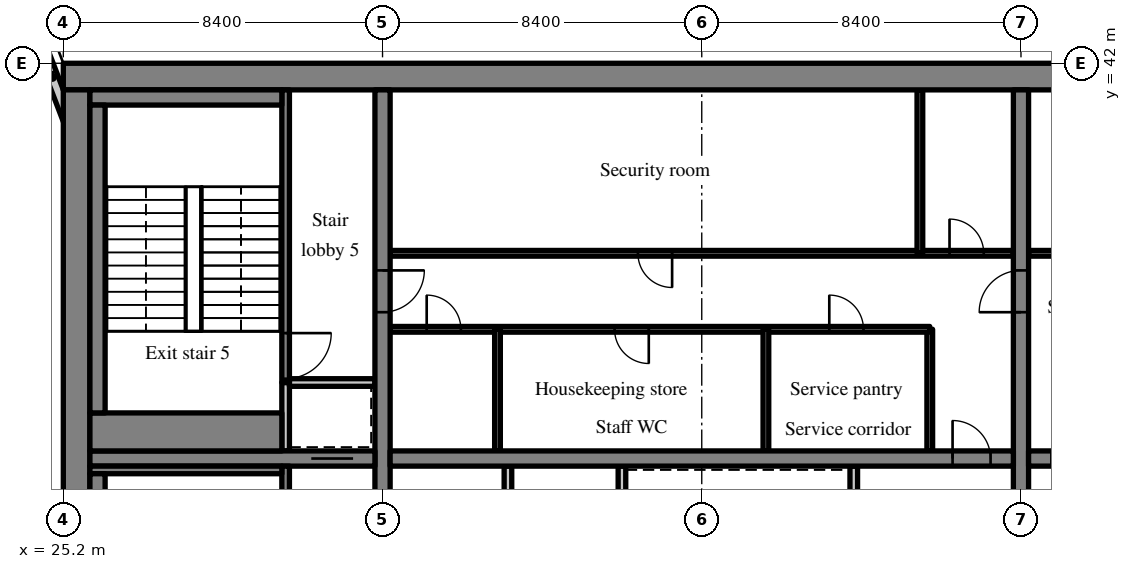
"""IFC4 building model, lengths in metres.
Left out: names, types, materials, properties, quantities, classifications, styles, units other than length and angle.
Written with IfcOpenShell. Run it as: python <this file> out.ifc"""

import sys

from ifc_helpers import new_model, si_unit, direction, frame, frame_2d, origin, place, context, subcontext, project, spatial, rectangle, extrude, source, transform, mapped, element, fill, save


model = new_model("IFC4")
c1 = context("Model", 3, precision=1e-05, world=origin(), true_north=direction((0.0, 1.0)))
c2 = subcontext(c1, "Body", "Model", "MODEL_VIEW")
j1 = project(units=[si_unit("LENGTHUNIT", "METRE"), si_unit("PLANEANGLEUNIT", "RADIAN")], contexts=[c1])
p1 = place(None, origin())
s1 = spatial("IfcSite", under=j1, at=p1, CompositionType="ELEMENT")
p2 = place(p1, origin())
s2 = spatial("IfcBuilding", under=s1, at=p2, CompositionType="ELEMENT")
p3 = place(p2, frame((0.0, 0.0, 185.8)))
s3 = spatial("IfcBuildingStorey", under=s2, at=p3, CompositionType="ELEMENT", Elevation=185.8)
m1 = source(origin(), c2, "Body", "SweptSolid", [
    extrude(rectangle(XDim=50.4, YDim=0.7, at=frame_2d((25.2, 0.0))), origin(), (0.0, 0.0, 1.0), 3.52),
])
p4 = place(p3, frame((25.2, 41.65, 0.0), z_axis=(0.0, 0.0, 1.0), x_axis=(1.0, 0.0, 0.0)))
e1 = element("IfcWall", 1, at=p4, inside=s3, PredefinedType="SHEAR", context=c2, shape_type="MappedRepresentation", body=[
    mapped(m1, transform((0.0, 0.0, 0.0), scale=1.0)),
])
m2 = source(origin(), c2, "Body", "SweptSolid", [
    extrude(rectangle(XDim=18.6, YDim=0.7, at=frame_2d((9.3, 0.0))), origin(), (0.0, 0.0, 1.0), 3.52),
])
p5 = place(p3, frame((25.55, 22.7, 0.0), z_axis=(0.0, 0.0, 1.0), x_axis=(0.0, 1.0, 0.0)))
e2 = element("IfcWall", 2, at=p5, inside=s3, PredefinedType="SHEAR", context=c2, shape_type="MappedRepresentation", body=[
    mapped(m2, transform((0.0, 0.0, 0.0), scale=1.0)),
])
m3 = source(origin(), c2, "Body", "SweptSolid", [
    extrude(rectangle(XDim=18.6, YDim=0.4, at=frame_2d((9.3, 0.0))), origin(), (0.0, 0.0, 1.0), 3.52),
])
p6 = place(p3, frame((33.6, 22.7, 0.0), z_axis=(0.0, 0.0, 1.0), x_axis=(0.0, 1.0, 0.0)))
e3 = element("IfcWall", 3, at=p6, inside=s3, PredefinedType="SHEAR", context=c2, shape_type="MappedRepresentation", body=[
    mapped(m3, transform((0.0, 0.0, 0.0), scale=1.0)),
])
m4 = source(origin(), c2, "Body", "SweptSolid", [
    extrude(rectangle(XDim=1.1, YDim=2.1, at=frame_2d((0.55, 1.05))), frame((0.0, 0.21, 0.0), z_axis=(0.0, -1.0, 0.0), x_axis=(1.0, 0.0, 0.0)), (0.0, 0.0, 1.0), 0.42),
])
p7 = place(p6, frame((12.75, 0.0, 0.0)))
e4 = element("IfcOpeningElement", 4, at=p7, cuts=e3, PredefinedType="OPENING", context=c2, shape_type="MappedRepresentation", body=[
    mapped(m4, transform((0.0, 0.0, 0.0), scale=1.0)),
])
p8 = place(p3, frame((50.4, 22.7, 0.0), z_axis=(0.0, 0.0, 1.0), x_axis=(0.0, 1.0, 0.0)))
e5 = element("IfcWall", 5, at=p8, inside=s3, PredefinedType="SHEAR", context=c2, shape_type="MappedRepresentation", body=[
    mapped(m3, transform((0.0, 0.0, 0.0), scale=1.0)),
])
p9 = place(p8, frame((12.75, 0.0, 0.0)))
e6 = element("IfcOpeningElement", 6, at=p9, cuts=e5, PredefinedType="OPENING", context=c2, shape_type="MappedRepresentation", body=[
    mapped(m4, transform((0.0, 0.0, 0.0), scale=1.0)),
])
m5 = source(origin(), c2, "Body", "SweptSolid", [
    extrude(rectangle(XDim=7.5, YDim=0.4, at=frame_2d((3.75, 0.0))), origin(), (0.0, 0.0, 1.0), 3.52),
])
p10 = place(p3, frame((25.9, 31.6, 0.0), z_axis=(0.0, 0.0, 1.0), x_axis=(1.0, 0.0, 0.0)))
e7 = element("IfcWall", 7, at=p10, inside=s3, PredefinedType="SHEAR", context=c2, shape_type="MappedRepresentation", body=[
    mapped(m5, transform((0.0, 0.0, 0.0), scale=1.0)),
])
p11 = place(p10, frame((5.825, 0.0, 0.0)))
e8 = element("IfcOpeningElement", 8, at=p11, cuts=e7, PredefinedType="OPENING", context=c2, shape_type="MappedRepresentation", body=[
    mapped(m4, transform((0.0, 0.0, 0.0), scale=1.0)),
])
m6 = source(origin(), c2, "Body", "SweptSolid", [
    extrude(rectangle(XDim=16.4, YDim=0.4, at=frame_2d((8.2, 0.0))), origin(), (0.0, 0.0, 1.0), 3.52),
])
p12 = place(p3, frame((33.8, 31.6, 0.0), z_axis=(0.0, 0.0, 1.0), x_axis=(1.0, 0.0, 0.0)))
e9 = element("IfcWall", 9, at=p12, inside=s3, PredefinedType="SHEAR", context=c2, shape_type="MappedRepresentation", body=[
    mapped(m6, transform((0.0, 0.0, 0.0), scale=1.0)),
])
m7 = source(origin(), c2, "Body", "SweptSolid", [
    extrude(rectangle(XDim=1.0, YDim=2.1, at=frame_2d((0.5, 1.05))), frame((0.0, 0.21, 0.0), z_axis=(0.0, -1.0, 0.0), x_axis=(1.0, 0.0, 0.0)), (0.0, 0.0, 1.0), 0.42),
])
p13 = place(p12, frame((14.8, 0.0, 0.0)))
e10 = element("IfcOpeningElement", 10, at=p13, cuts=e9, PredefinedType="OPENING", context=c2, shape_type="MappedRepresentation", body=[
    mapped(m7, transform((0.0, 0.0, 0.0), scale=1.0)),
])
p14 = place(p3, frame((50.6, 31.6, 0.0), z_axis=(0.0, 0.0, 1.0), x_axis=(1.0, 0.0, 0.0)))
e11 = element("IfcWall", 11, at=p14, inside=s3, PredefinedType="SHEAR", context=c2, shape_type="MappedRepresentation", body=[
    mapped(m6, transform((0.0, 0.0, 0.0), scale=1.0)),
])
p15 = place(p14, frame((0.6, 0.0, 0.0)))
e12 = element("IfcOpeningElement", 12, at=p15, cuts=e11, PredefinedType="OPENING", context=c2, shape_type="MappedRepresentation", body=[
    mapped(m7, transform((0.0, 0.0, 0.0), scale=1.0)),
])
m8 = source(origin(), c2, "Body", "SweptSolid", [
    extrude(rectangle(XDim=3.559, YDim=0.3, at=frame_2d((1.78, 0.0))), origin(), (0.0, 0.0, 1.0), 3.52),
])
p16 = place(p3, frame((25.55, 39.969, 0.0), z_axis=(0.0, 0.0, 1.0), x_axis=(-0.35779745313, 0.933799219604, 0.0)))
e13 = element("IfcWall", 13, at=p16, inside=s3, PredefinedType="SOLIDWALL", context=c2, shape_type="MappedRepresentation", body=[
    mapped(m8, transform((0.0, 0.0, 0.0), scale=1.0)),
])
m9 = source(origin(), c2, "Body", "SweptSolid", [
    extrude(rectangle(XDim=1.5, YDim=2.0, at=frame_2d((0.75, 1.0))), frame((0.0, 0.16, 0.0), z_axis=(0.0, -1.0, 0.0), x_axis=(1.0, 0.0, 0.0)), (0.0, 0.0, 1.0), 0.32),
])
p17 = place(p16, frame((1.903, 0.0, 0.9)))
e14 = element("IfcOpeningElement", 14, at=p17, cuts=e13, PredefinedType="OPENING", context=c2, shape_type="MappedRepresentation", body=[
    mapped(m9, transform((0.0, 0.0, 0.0), scale=1.0)),
])
m10 = source(origin(), c2, "Body", "SweptSolid", [
    extrude(rectangle(XDim=8.7, YDim=0.2, at=frame_2d((4.35, 0.0))), origin(), (0.0, 0.0, 1.0), 3.52),
])
p18 = place(p3, frame((39.9, 22.7, 0.0), z_axis=(0.0, 0.0, 1.0), x_axis=(0.0, 1.0, 0.0)))
e15 = element("IfcWall", 15, at=p18, inside=s3, PredefinedType="PARTITIONING", context=c2, shape_type="MappedRepresentation", body=[
    mapped(m10, transform((0.0, 0.0, 0.0), scale=1.0)),
])
m11 = source(origin(), c2, "Body", "SweptSolid", [
    extrude(rectangle(XDim=0.9, YDim=2.1, at=frame_2d((0.45, 1.05))), frame((0.0, 0.11, 0.0), z_axis=(0.0, -1.0, 0.0), x_axis=(1.0, 0.0, 0.0)), (0.0, 0.0, 1.0), 0.22),
])
p19 = place(p18, frame((3.05, 0.0, 0.0)))
e16 = element("IfcOpeningElement", 16, at=p19, cuts=e15, PredefinedType="OPENING", context=c2, shape_type="MappedRepresentation", body=[
    mapped(m11, transform((0.0, 0.0, 0.0), scale=1.0)),
])
p20 = place(p18, frame((4.85, 0.0, 0.0)))
e17 = element("IfcOpeningElement", 17, at=p20, cuts=e15, PredefinedType="OPENING", context=c2, shape_type="MappedRepresentation", body=[
    mapped(m11, transform((0.0, 0.0, 0.0), scale=1.0)),
])
m12 = source(origin(), c2, "Body", "SweptSolid", [
    extrude(rectangle(XDim=2.6, YDim=0.2, at=frame_2d((1.3, 0.0))), origin(), (0.0, 0.0, 1.0), 3.52),
])
p21 = place(p3, frame((46.0, 28.8, 0.0), z_axis=(0.0, 0.0, 1.0), x_axis=(0.0, 1.0, 0.0)))
e18 = element("IfcWall", 18, at=p21, inside=s3, PredefinedType="SOLIDWALL", context=c2, shape_type="MappedRepresentation", body=[
    mapped(m12, transform((0.0, 0.0, 0.0), scale=1.0)),
])
p22 = place(p3, frame((36.9, 22.7, 0.0), z_axis=(0.0, 0.0, 1.0), x_axis=(0.0, 1.0, 0.0)))
e19 = element("IfcWall", 19, at=p22, inside=s3, PredefinedType="PARTITIONING", context=c2, shape_type="MappedRepresentation", body=[
    mapped(m10, transform((0.0, 0.0, 0.0), scale=1.0)),
])
m13 = source(origin(), c2, "Body", "SweptSolid", [
    extrude(rectangle(XDim=3.2, YDim=0.15, at=frame_2d((1.6, 0.0))), origin(), (0.0, 0.0, 1.0), 3.52),
])
p23 = place(p3, frame((48.0, 31.8, 0.0), z_axis=(0.0, 0.0, 1.0), x_axis=(0.0, 1.0, 0.0)))
e20 = element("IfcWall", 20, at=p23, inside=s3, PredefinedType="PARTITIONING", context=c2, shape_type="MappedRepresentation", body=[
    mapped(m13, transform((0.0, 0.0, 0.0), scale=1.0)),
])
m14 = source(origin(), c2, "Body", "SweptSolid", [
    extrude(rectangle(XDim=14.2, YDim=0.15, at=frame_2d((7.1, 0.0))), origin(), (0.0, 0.0, 1.0), 3.52),
])
p24 = place(p3, frame((33.8, 35.0, 0.0), z_axis=(0.0, 0.0, 1.0), x_axis=(1.0, 0.0, 0.0)))
e21 = element("IfcWall", 21, at=p24, inside=s3, PredefinedType="PARTITIONING", context=c2, shape_type="MappedRepresentation", body=[
    mapped(m14, transform((0.0, 0.0, 0.0), scale=1.0)),
])
m15 = source(origin(), c2, "Body", "SweptSolid", [
    extrude(rectangle(XDim=0.9, YDim=2.1, at=frame_2d((0.45, 1.05))), frame((0.0, 0.085, 0.0), z_axis=(0.0, -1.0, 0.0), x_axis=(1.0, 0.0, 0.0)), (0.0, 0.0, 1.0), 0.17),
])
p25 = place(p24, frame((0.962, 0.0, 0.0)))
e22 = element("IfcOpeningElement", 22, at=p25, cuts=e21, PredefinedType="OPENING", context=c2, shape_type="MappedRepresentation", body=[
    mapped(m15, transform((0.0, 0.0, 0.0), scale=1.0)),
])
p26 = place(p24, frame((5.906, 0.0, 0.0)))
e23 = element("IfcOpeningElement", 23, at=p26, cuts=e21, PredefinedType="OPENING", context=c2, shape_type="MappedRepresentation", body=[
    mapped(m15, transform((0.0, 0.0, 0.0), scale=1.0)),
])
p27 = place(p24, frame((11.556, 0.0, 0.0)))
e24 = element("IfcOpeningElement", 24, at=p27, cuts=e21, PredefinedType="OPENING", context=c2, shape_type="MappedRepresentation", body=[
    mapped(m15, transform((0.0, 0.0, 0.0), scale=1.0)),
])
m16 = source(origin(), c2, "Body", "SweptSolid", [
    extrude(rectangle(XDim=16.4, YDim=0.15, at=frame_2d((8.2, 0.0))), origin(), (0.0, 0.0, 1.0), 3.52),
])
p28 = place(p3, frame((33.8, 37.0, 0.0), z_axis=(0.0, 0.0, 1.0), x_axis=(1.0, 0.0, 0.0)))
e25 = element("IfcWall", 25, at=p28, inside=s3, PredefinedType="PARTITIONING", context=c2, shape_type="MappedRepresentation", body=[
    mapped(m16, transform((0.0, 0.0, 0.0), scale=1.0)),
])
p29 = place(p28, frame((6.52, 0.0, 0.0)))
e26 = element("IfcOpeningElement", 26, at=p29, cuts=e25, PredefinedType="OPENING", context=c2, shape_type="MappedRepresentation", body=[
    mapped(m15, transform((0.0, 0.0, 0.0), scale=1.0)),
])
p30 = place(p28, frame((14.72, 0.0, 0.0)))
e27 = element("IfcOpeningElement", 27, at=p30, cuts=e25, PredefinedType="OPENING", context=c2, shape_type="MappedRepresentation", body=[
    mapped(m15, transform((0.0, 0.0, 0.0), scale=1.0)),
])
for number, where, z_axis, x_axis in (
    (28, (36.625, 31.8, 0.0), (0.0, 0.0, 1.0), (0.0, 1.0, 0.0)),
    (29, (43.688, 31.8, 0.0), (0.0, 0.0, 1.0), (0.0, 1.0, 0.0)),
):
    element("IfcWall", number, at=place(p3, frame(where, z_axis=z_axis, x_axis=x_axis)), inside=s3, PredefinedType="PARTITIONING", context=c2, shape_type="MappedRepresentation", body=[
        mapped(m13, transform((0.0, 0.0, 0.0), scale=1.0)),
    ])
m17 = source(origin(), c2, "Body", "SweptSolid", [
    extrude(rectangle(XDim=4.3, YDim=0.15, at=frame_2d((2.15, 0.0))), origin(), (0.0, 0.0, 1.0), 3.52),
])
p31 = place(p3, frame((47.74, 37.0, 0.0), z_axis=(0.0, 0.0, 1.0), x_axis=(0.0, 1.0, 0.0)))
e30 = element("IfcWall", 30, at=p31, inside=s3, PredefinedType="PARTITIONING", context=c2, shape_type="MappedRepresentation", body=[
    mapped(m17, transform((0.0, 0.0, 0.0), scale=1.0)),
])
p32 = place(p3, frame((67.0, 37.0, 0.0), z_axis=(0.0, 0.0, 1.0), x_axis=(-1.0, 0.0, 0.0)))
e31 = element("IfcWall", 31, at=p32, inside=s3, PredefinedType="PARTITIONING", context=c2, shape_type="MappedRepresentation", body=[
    mapped(m16, transform((0.0, 0.0, 0.0), scale=1.0)),
])
p33 = place(p32, frame((1.6, 0.0, 0.0)))
e32 = element("IfcOpeningElement", 32, at=p33, cuts=e31, PredefinedType="OPENING", context=c2, shape_type="MappedRepresentation", body=[
    mapped(m15, transform((0.0, 0.0, 0.0), scale=1.0)),
])
p34 = place(p32, frame((7.34, 0.0, 0.0)))
e33 = element("IfcOpeningElement", 33, at=p34, cuts=e31, PredefinedType="OPENING", context=c2, shape_type="MappedRepresentation", body=[
    mapped(m15, transform((0.0, 0.0, 0.0), scale=1.0)),
])
p35 = place(p32, frame((12.26, 0.0, 0.0)))
e34 = element("IfcOpeningElement", 34, at=p35, cuts=e31, PredefinedType="OPENING", context=c2, shape_type="MappedRepresentation", body=[
    mapped(m15, transform((0.0, 0.0, 0.0), scale=1.0)),
])
p36 = place(p32, frame((14.72, 0.0, 0.0)))
e35 = element("IfcOpeningElement", 35, at=p36, cuts=e31, PredefinedType="OPENING", context=c2, shape_type="MappedRepresentation", body=[
    mapped(m15, transform((0.0, 0.0, 0.0), scale=1.0)),
])
m18 = source(origin(), c2, "Body", "SweptSolid", [
    extrude(rectangle(XDim=8.7, YDim=0.2, at=frame_2d((4.35, 0.0))), origin(), (0.0, 0.0, 1.0), 3.52),
])
p37 = place(p3, frame((31.05, 22.7, 0.0), z_axis=(0.0, 0.0, 1.0), x_axis=(0.0, 1.0, 0.0)))
e36 = element("IfcWall", 36, at=p37, inside=s3, PredefinedType="SOLIDWALL", context=c2, shape_type="MappedRepresentation", body=[
    mapped(m18, transform((0.0, 0.0, 0.0), scale=1.0)),
])
m19 = source(origin(), c2, "Body", "SweptSolid", [
    extrude(rectangle(XDim=1.2, YDim=2.1, at=frame_2d((0.6, 1.05))), frame((0.0, 0.11, 0.0), z_axis=(0.0, -1.0, 0.0), x_axis=(1.0, 0.0, 0.0)), (0.0, 0.0, 1.0), 0.22),
])
p38 = place(p37, frame((0.9, 0.0, 0.0)))
e37 = element("IfcOpeningElement", 37, at=p38, cuts=e36, PredefinedType="OPENING", context=c2, shape_type="MappedRepresentation", body=[
    mapped(m19, transform((0.0, 0.0, 0.0), scale=1.0)),
])
m20 = source(origin(), c2, "Body", "SweptSolid", [
    extrude(rectangle(XDim=1.8, YDim=0.2, at=frame_2d((0.9, 0.0))), origin(), (0.0, 0.0, 1.0), 3.52),
])
p39 = place(p3, frame((31.05, 31.8, 0.0), z_axis=(0.0, 0.0, 1.0), x_axis=(0.0, 1.0, 0.0)))
e38 = element("IfcWall", 38, at=p39, inside=s3, PredefinedType="SOLIDWALL", context=c2, shape_type="MappedRepresentation", body=[
    mapped(m20, transform((0.0, 0.0, 0.0), scale=1.0)),
])
m21 = source(origin(), c2, "Body", "SweptSolid", [
    extrude(rectangle(XDim=2.25, YDim=0.2, at=frame_2d((1.125, 0.0))), origin(), (0.0, 0.0, 1.0), 3.52),
])
p40 = place(p3, frame((31.15, 33.6, 0.0), z_axis=(0.0, 0.0, 1.0), x_axis=(1.0, 0.0, 0.0)))
e39 = element("IfcWall", 39, at=p40, inside=s3, PredefinedType="SOLIDWALL", context=c2, shape_type="MappedRepresentation", body=[
    mapped(m21, transform((0.0, 0.0, 0.0), scale=1.0)),
])
m22 = source(origin(), c2, "Body", "SweptSolid", [
    extrude(rectangle(XDim=7.7, YDim=0.2, at=frame_2d((3.85, 0.0))), origin(), (0.0, 0.0, 1.0), 3.52),
])
p41 = place(p3, frame((31.05, 33.6, 0.0), z_axis=(0.0, 0.0, 1.0), x_axis=(0.0, 1.0, 0.0)))
e40 = element("IfcWall", 40, at=p41, inside=s3, PredefinedType="SOLIDWALL", context=c2, shape_type="MappedRepresentation", body=[
    mapped(m22, transform((0.0, 0.0, 0.0), scale=1.0)),
])
p42 = place(p41, frame((0.1, 0.0, 0.0)))
e41 = element("IfcOpeningElement", 41, at=p42, cuts=e40, PredefinedType="OPENING", context=c2, shape_type="MappedRepresentation", body=[
    mapped(m19, transform((0.0, 0.0, 0.0), scale=1.0)),
])
m23 = source(origin(), c2, "Body", "SweptSolid", [
    extrude(rectangle(XDim=5.05, YDim=0.2, at=frame_2d((2.525, 0.0))), origin(), (0.0, 0.0, 1.0), 3.52),
])
p43 = place(p3, frame((25.9, 31.3, 0.0), z_axis=(0.0, 0.0, 1.0), x_axis=(1.0, 0.0, 0.0)))
e42 = element("IfcWall", 42, at=p43, inside=s3, PredefinedType="SOLIDWALL", context=c2, shape_type="MappedRepresentation", body=[
    mapped(m23, transform((0.0, 0.0, 0.0), scale=1.0)),
])
m24 = source(origin(), c2, "Body", "SweptSolid", [
    extrude(rectangle(XDim=8.1, YDim=0.4, at=frame_2d((4.05, 0.0))), origin(), (0.0, 0.0, 1.0), 3.52),
])
p44 = place(p3, frame((26.1, 23.1, 0.0), z_axis=(0.0, 0.0, 1.0), x_axis=(0.0, 1.0, 0.0)))
e43 = element("IfcWall", 43, at=p44, inside=s3, PredefinedType="SOLIDWALL", context=c2, shape_type="MappedRepresentation", body=[
    mapped(m24, transform((0.0, 0.0, 0.0), scale=1.0)),
])
m25 = source(origin(), c2, "Body", "SweptSolid", [
    extrude(rectangle(XDim=5.05, YDim=0.4, at=frame_2d((2.525, 0.0))), origin(), (0.0, 0.0, 1.0), 3.52),
])
p45 = place(p3, frame((25.9, 41.1, 0.0), z_axis=(0.0, 0.0, 1.0), x_axis=(1.0, 0.0, 0.0)))
e44 = element("IfcWall", 44, at=p45, inside=s3, PredefinedType="SOLIDWALL", context=c2, shape_type="MappedRepresentation", body=[
    mapped(m25, transform((0.0, 0.0, 0.0), scale=1.0)),
])
m26 = source(origin(), c2, "Body", "SweptSolid", [
    extrude(rectangle(XDim=5.05, YDim=1.0, at=frame_2d((2.525, 0.0))), origin(), (0.0, 0.0, 1.0), 3.52),
])
p46 = place(p3, frame((25.9, 32.3, 0.0), z_axis=(0.0, 0.0, 1.0), x_axis=(1.0, 0.0, 0.0)))
e45 = element("IfcWall", 45, at=p46, inside=s3, PredefinedType="SOLIDWALL", context=c2, shape_type="MappedRepresentation", body=[
    mapped(m26, transform((0.0, 0.0, 0.0), scale=1.0)),
])
p47 = place(p3, frame((26.1, 32.8, 0.0), z_axis=(0.0, 0.0, 1.0), x_axis=(0.0, 1.0, 0.0)))
e46 = element("IfcWall", 46, at=p47, inside=s3, PredefinedType="SOLIDWALL", context=c2, shape_type="MappedRepresentation", body=[
    mapped(m24, transform((0.0, 0.0, 0.0), scale=1.0)),
])
m27 = source(origin(), c2, "Body", "SweptSolid", [
    extrude(rectangle(XDim=1.0, YDim=2.1, at=frame_2d((0.5, 1.05))), frame((0.0, 0.025, 0.0), z_axis=(0.0, -1.0, 0.0), x_axis=(1.0, 0.0, 0.0)), (0.0, 0.0, 1.0), 0.05),
])
p48 = place(p13, origin())
e47 = element("IfcDoor", 47, at=p48, inside=s3, OperationType="SINGLE_SWING_LEFT", PredefinedType="DOOR", context=c2, shape_type="MappedRepresentation", body=[
    mapped(m27, transform((0.0, 0.0, 0.0), scale=1.0)),
])
fill(e10, e47)
m28 = source(origin(), c2, "Body", "SweptSolid", [
    extrude(rectangle(XDim=0.9, YDim=2.1, at=frame_2d((0.45, 1.05))), frame((0.0, 0.025, 0.0), z_axis=(0.0, -1.0, 0.0), x_axis=(1.0, 0.0, 0.0)), (0.0, 0.0, 1.0), 0.05),
])
p49 = place(p25, origin())
e48 = element("IfcDoor", 48, at=p49, inside=s3, OperationType="SINGLE_SWING_LEFT", PredefinedType="DOOR", context=c2, shape_type="MappedRepresentation", body=[
    mapped(m28, transform((0.0, 0.0, 0.0), scale=1.0)),
])
fill(e22, e48)
p50 = place(p26, origin())
e49 = element("IfcDoor", 49, at=p50, inside=s3, OperationType="SINGLE_SWING_RIGHT", PredefinedType="DOOR", context=c2, shape_type="MappedRepresentation", body=[
    mapped(m28, transform((0.0, 0.0, 0.0), scale=1.0)),
])
fill(e23, e49)
p51 = place(p27, origin())
e50 = element("IfcDoor", 50, at=p51, inside=s3, OperationType="SINGLE_SWING_LEFT", PredefinedType="DOOR", context=c2, shape_type="MappedRepresentation", body=[
    mapped(m28, transform((0.0, 0.0, 0.0), scale=1.0)),
])
fill(e24, e50)
p52 = place(p29, origin())
e51 = element("IfcDoor", 51, at=p52, inside=s3, OperationType="SINGLE_SWING_RIGHT", PredefinedType="DOOR", context=c2, shape_type="MappedRepresentation", body=[
    mapped(m28, transform((0.0, 0.0, 0.0), scale=1.0)),
])
fill(e26, e51)
p53 = place(p30, origin())
e52 = element("IfcDoor", 52, at=p53, inside=s3, OperationType="SINGLE_SWING_LEFT", PredefinedType="DOOR", context=c2, shape_type="MappedRepresentation", body=[
    mapped(m28, transform((0.0, 0.0, 0.0), scale=1.0)),
])
fill(e27, e52)
m29 = source(origin(), c2, "Body", "SweptSolid", [
    extrude(rectangle(XDim=1.1, YDim=2.1, at=frame_2d((0.55, 1.05))), frame((0.0, 0.025, 0.0), z_axis=(0.0, -1.0, 0.0), x_axis=(1.0, 0.0, 0.0)), (0.0, 0.0, 1.0), 0.05),
])
p54 = place(p11, origin())
e53 = element("IfcDoor", 53, at=p54, inside=s3, OperationType="SLIDING_TO_RIGHT", PredefinedType="DOOR", context=c2, shape_type="MappedRepresentation", body=[
    mapped(m29, transform((0.0, 0.0, 0.0), scale=1.0)),
])
fill(e8, e53)
m30 = source(origin(), c2, "Body", "SweptSolid", [
    extrude(rectangle(XDim=1.2, YDim=2.1, at=frame_2d((0.6, 1.05))), frame((0.0, 0.025, 0.0), z_axis=(0.0, -1.0, 0.0), x_axis=(1.0, 0.0, 0.0)), (0.0, 0.0, 1.0), 0.05),
])
p55 = place(p42, origin())
e54 = element("IfcDoor", 54, at=p55, inside=s3, OperationType="SINGLE_SWING_RIGHT", PredefinedType="DOOR", context=c2, shape_type="MappedRepresentation", body=[
    mapped(m30, transform((0.0, 0.0, 0.0), scale=1.0)),
])
fill(e41, e54)
p56 = place(p7, origin())
e55 = element("IfcDoor", 55, at=p56, inside=s3, OperationType="SINGLE_SWING_RIGHT", PredefinedType="DOOR", context=c2, shape_type="MappedRepresentation", body=[
    mapped(m29, transform((0.0, 0.0, 0.0), scale=1.0)),
])
fill(e4, e55)
p57 = place(p9, origin())
e56 = element("IfcDoor", 56, at=p57, inside=s3, OperationType="SINGLE_SWING_LEFT", PredefinedType="DOOR", context=c2, shape_type="MappedRepresentation", body=[
    mapped(m29, transform((0.0, 0.0, 0.0), scale=1.0)),
])
fill(e6, e56)
save(model, sys.argv[1])
